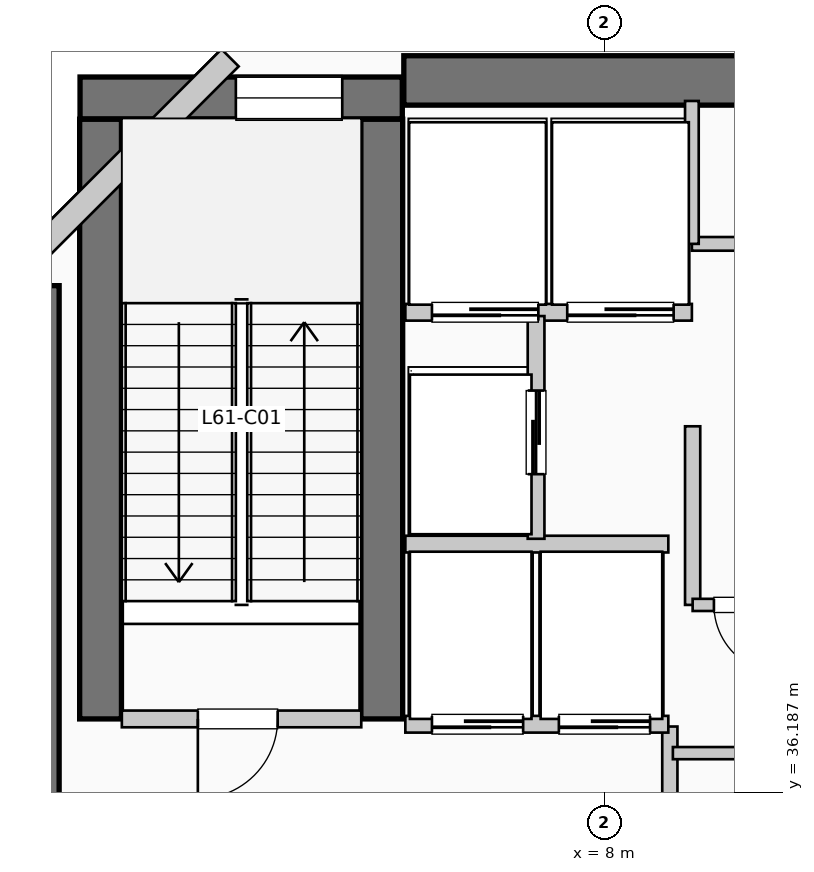
"""IFC4 building model, lengths in metres.
Left out: names, types, materials, properties, quantities, classifications, styles, units other than length and angle.
Written with IfcOpenShell. Run it as: python <this file> out.ifc"""

import sys

from ifc_helpers import new_model, si_unit, direction, frame, frame_2d, origin, place, context, subcontext, project, spatial, rectangle, extrude, element, fill, save


model = new_model("IFC4")
c1 = context("Model", 3, precision=1e-05, world=origin(), true_north=direction((0.0, 1.0)))
c2 = subcontext(c1, "Body", "Model", "MODEL_VIEW")
j1 = project(units=[si_unit("LENGTHUNIT", "METRE"), si_unit("PLANEANGLEUNIT", "RADIAN")], contexts=[c1])
p1 = place(None, origin())
s1 = spatial("IfcSite", under=j1, at=p1, CompositionType="ELEMENT")
p2 = place(p1, origin())
s2 = spatial("IfcBuilding", under=s1, at=p2, CompositionType="ELEMENT")
p3 = place(p2, frame((0.0, 0.0, 251.46)))
s3 = spatial("IfcBuildingStorey", under=s2, at=p3, CompositionType="ELEMENT", Elevation=251.46)
p4 = place(p3, frame((5.36, 45.55, 0.0), z_axis=(0.0, 0.0, 1.0), x_axis=(1.0, 0.0, 0.0)))
e1 = element("IfcWall", 1, at=p4, inside=s3, PredefinedType="SHEAR", context=c2, shape_type="SweptSolid", body=[
    extrude(rectangle(XDim=13.98, YDim=0.65, at=frame_2d((6.99, 0.0))), origin(), (0.0, 0.0, 1.0), 4.95),
])
p5 = place(p3, frame((0.5, 34.95, 0.0), z_axis=(0.0, 0.0, 1.0), x_axis=(0.0, 1.0, 0.0)))
e2 = element("IfcWall", 2, at=p5, inside=s3, PredefinedType="SHEAR", context=c2, shape_type="SweptSolid", body=[
    extrude(rectangle(XDim=7.9, YDim=0.65, at=frame_2d((3.95, 0.0))), origin(), (0.0, 0.0, 1.0), 4.95),
])
for number, where, z_axis, x_axis in (
    (3, (1.37, 37.15, 0.0), (0.0, 0.0, 1.0), (0.0, 1.0, 0.0)),
    (4, (5.07, 37.15, 0.0), (0.0, 0.0, 1.0), (0.0, 1.0, 0.0)),
):
    element("IfcWall", number, at=place(p3, frame(where, z_axis=z_axis, x_axis=x_axis)), inside=s3, PredefinedType="SHEAR", context=c2, shape_type="SweptSolid", body=[
        extrude(rectangle(XDim=7.89, YDim=0.55, at=frame_2d((3.945, 0.0))), origin(), (0.0, 0.0, 1.0), 4.95),
    ])
p6 = place(p3, frame((1.1, 45.32, 0.0), z_axis=(0.0, 0.0, 1.0), x_axis=(1.0, 0.0, 0.0)))
e5 = element("IfcWall", 5, at=p6, inside=s3, PredefinedType="SHEAR", context=c2, shape_type="SweptSolid", body=[
    extrude(rectangle(XDim=4.24, YDim=0.55, at=frame_2d((2.12, 0.0))), origin(), (0.0, 0.0, 1.0), 4.95),
])
p7 = place(p6, frame((2.05, 0.0, 1.05)))
e6 = element("IfcOpeningElement", 6, at=p7, cuts=e5, PredefinedType="OPENING", context=c2, shape_type="SweptSolid", body=[
    extrude(rectangle(XDim=1.4, YDim=1.8, at=frame_2d((0.7, 0.9))), frame((0.0, 0.285, 0.0), z_axis=(0.0, -1.0, 0.0), x_axis=(1.0, 0.0, 0.0)), (0.0, 0.0, 1.0), 0.57),
])
p8 = place(p3, frame((3.074, 45.848, 0.0), z_axis=(0.0, 0.0, 1.0), x_axis=(-0.707106781187, -0.707106781187, 0.0)))
e7 = element("IfcWall", 7, at=p8, inside=s3, PredefinedType="SOLIDWALL", context=c2, shape_type="SweptSolid", body=[
    extrude(rectangle(XDim=4.133, YDim=0.32, at=frame_2d((2.066, 0.0))), origin(), (0.0, 0.0, 1.0), 4.7),
])
p9 = place(p3, frame((1.65, 37.15, 0.0), z_axis=(0.0, 0.0, 1.0), x_axis=(1.0, 0.0, 0.0)))
e8 = element("IfcWall", 8, at=p9, inside=s3, PredefinedType="PARTITIONING", context=c2, shape_type="SweptSolid", body=[
    extrude(rectangle(XDim=3.15, YDim=0.22, at=frame_2d((1.575, 0.0))), origin(), (0.0, 0.0, 1.0), 4.7),
])
p10 = place(p9, frame((2.05, 0.0, 0.0), z_axis=(0.0, 0.0, 1.0), x_axis=(-1.0, 0.0, 0.0)))
e9 = element("IfcOpeningElement", 9, at=p10, cuts=e8, PredefinedType="OPENING", context=c2, shape_type="SweptSolid", body=[
    extrude(rectangle(XDim=1.05, YDim=2.15, at=frame_2d((0.525, 1.075))), frame((0.0, 0.12, 0.0), z_axis=(0.0, -1.0, 0.0), x_axis=(1.0, 0.0, 0.0)), (0.0, 0.0, 1.0), 0.24),
])
p11 = place(p3, frame((8.86, 34.55, 0.0), z_axis=(0.0, 0.0, 1.0), x_axis=(0.0, 1.0, 0.0)))
e10 = element("IfcWall", 10, at=p11, inside=s3, PredefinedType="PARTITIONING", context=c2, shape_type="SweptSolid", body=[
    extrude(rectangle(XDim=2.5, YDim=0.2, at=frame_2d((1.25, 0.0))), origin(), (0.0, 0.0, 1.0), 4.7),
])
p12 = place(p3, frame((5.38, 37.08, 0.0), z_axis=(0.0, 0.0, 1.0), x_axis=(1.0, 0.0, 0.0)))
e11 = element("IfcWall", 11, at=p12, inside=s3, PredefinedType="PARTITIONING", context=c2, shape_type="SweptSolid", body=[
    extrude(rectangle(XDim=3.46, YDim=0.22, at=frame_2d((1.73, 0.0))), origin(), (0.0, 0.0, 1.0), 4.7),
])
p13 = place(p12, frame((1.55, 0.0, 0.0), z_axis=(0.0, 0.0, 1.0), x_axis=(-1.0, 0.0, 0.0)))
e12 = element("IfcOpeningElement", 12, at=p13, cuts=e11, PredefinedType="OPENING", context=c2, shape_type="SweptSolid", body=[
    extrude(rectangle(XDim=1.2, YDim=2.2, at=frame_2d((0.6, 1.1))), frame((0.0, 0.12, 0.0), z_axis=(0.0, -1.0, 0.0), x_axis=(1.0, 0.0, 0.0)), (0.0, 0.0, 1.0), 0.24),
])
p14 = place(p12, frame((3.22, 0.0, 0.0), z_axis=(0.0, 0.0, 1.0), x_axis=(-1.0, 0.0, 0.0)))
e13 = element("IfcOpeningElement", 13, at=p14, cuts=e11, PredefinedType="OPENING", context=c2, shape_type="SweptSolid", body=[
    extrude(rectangle(XDim=1.2, YDim=2.2, at=frame_2d((0.6, 1.1))), frame((0.0, 0.12, 0.0), z_axis=(0.0, -1.0, 0.0), x_axis=(1.0, 0.0, 0.0)), (0.0, 0.0, 1.0), 0.24),
])
p15 = place(p3, frame((5.38, 39.45, 0.0), z_axis=(0.0, 0.0, 1.0), x_axis=(1.0, 0.0, 0.0)))
e14 = element("IfcWall", 14, at=p15, inside=s3, PredefinedType="PARTITIONING", context=c2, shape_type="SweptSolid", body=[
    extrude(rectangle(XDim=3.46, YDim=0.22, at=frame_2d((1.73, 0.0))), origin(), (0.0, 0.0, 1.0), 4.7),
])
p16 = place(p3, frame((5.38, 42.5, 0.0), z_axis=(0.0, 0.0, 1.0), x_axis=(1.0, 0.0, 0.0)))
e15 = element("IfcWall", 15, at=p16, inside=s3, PredefinedType="PARTITIONING", context=c2, shape_type="SweptSolid", body=[
    extrude(rectangle(XDim=3.77, YDim=0.22, at=frame_2d((1.885, 0.0))), origin(), (0.0, 0.0, 1.0), 4.7),
])
p17 = place(p16, frame((1.75, 0.0, 0.0), z_axis=(0.0, 0.0, 1.0), x_axis=(-1.0, 0.0, 0.0)))
e16 = element("IfcOpeningElement", 16, at=p17, cuts=e15, PredefinedType="OPENING", context=c2, shape_type="SweptSolid", body=[
    extrude(rectangle(XDim=1.4, YDim=2.2, at=frame_2d((0.7, 1.1))), frame((0.0, 0.12, 0.0), z_axis=(0.0, -1.0, 0.0), x_axis=(1.0, 0.0, 0.0)), (0.0, 0.0, 1.0), 0.24),
])
p18 = place(p16, frame((3.53, 0.0, 0.0), z_axis=(0.0, 0.0, 1.0), x_axis=(-1.0, 0.0, 0.0)))
e17 = element("IfcOpeningElement", 17, at=p18, cuts=e15, PredefinedType="OPENING", context=c2, shape_type="SweptSolid", body=[
    extrude(rectangle(XDim=1.4, YDim=2.2, at=frame_2d((0.7, 1.1))), frame((0.0, 0.12, 0.0), z_axis=(0.0, -1.0, 0.0), x_axis=(1.0, 0.0, 0.0)), (0.0, 0.0, 1.0), 0.24),
])
p19 = place(p3, frame((7.1, 39.52, 0.0), z_axis=(0.0, 0.0, 1.0), x_axis=(0.0, 1.0, 0.0)))
e18 = element("IfcWall", 18, at=p19, inside=s3, PredefinedType="PARTITIONING", context=c2, shape_type="SweptSolid", body=[
    extrude(rectangle(XDim=2.93, YDim=0.22, at=frame_2d((1.465, 0.0))), origin(), (0.0, 0.0, 1.0), 4.7),
])
p20 = place(p19, frame((0.85, 0.0, 0.0)))
e19 = element("IfcOpeningElement", 19, at=p20, cuts=e18, PredefinedType="OPENING", context=c2, shape_type="SweptSolid", body=[
    extrude(rectangle(XDim=1.1, YDim=2.2, at=frame_2d((0.55, 1.1))), frame((0.0, 0.12, 0.0), z_axis=(0.0, -1.0, 0.0), x_axis=(1.0, 0.0, 0.0)), (0.0, 0.0, 1.0), 0.24),
])
p21 = place(p3, frame((9.16, 38.65, 0.0), z_axis=(0.0, 0.0, 1.0), x_axis=(0.0, 1.0, 0.0)))
e20 = element("IfcWall", 20, at=p21, inside=s3, PredefinedType="PARTITIONING", context=c2, shape_type="SweptSolid", body=[
    extrude(rectangle(XDim=2.35, YDim=0.2, at=frame_2d((1.175, 0.0))), origin(), (0.0, 0.0, 1.0), 4.7),
])
p22 = place(p3, frame((8.9, 36.7, 0.0), z_axis=(0.0, 0.0, 1.0), x_axis=(1.0, 0.0, 0.0)))
e21 = element("IfcWall", 21, at=p22, inside=s3, PredefinedType="PARTITIONING", context=c2, shape_type="SweptSolid", body=[
    extrude(rectangle(XDim=3.25, YDim=0.16, at=frame_2d((1.625, 0.0))), origin(), (0.0, 0.0, 1.0), 4.7),
])
p23 = place(p22, frame((1.1, 0.0, 0.0)))
e22 = element("IfcOpeningElement", 22, at=p23, cuts=e21, PredefinedType="OPENING", context=c2, shape_type="SweptSolid", body=[
    extrude(rectangle(XDim=0.95, YDim=2.15, at=frame_2d((0.475, 1.075))), frame((0.0, 0.09, 0.0), z_axis=(0.0, -1.0, 0.0), x_axis=(1.0, 0.0, 0.0)), (0.0, 0.0, 1.0), 0.18),
])
p24 = place(p3, frame((9.16, 38.65, 0.0), z_axis=(0.0, 0.0, 1.0), x_axis=(1.0, 0.0, 0.0)))
e23 = element("IfcWall", 23, at=p24, inside=s3, PredefinedType="PARTITIONING", context=c2, shape_type="SweptSolid", body=[
    extrude(rectangle(XDim=3.42, YDim=0.16, at=frame_2d((1.71, 0.0))), origin(), (0.0, 0.0, 1.0), 4.7),
])
p25 = place(p24, frame((1.18, 0.0, 0.0), z_axis=(0.0, 0.0, 1.0), x_axis=(-1.0, 0.0, 0.0)))
e24 = element("IfcOpeningElement", 24, at=p25, cuts=e23, PredefinedType="OPENING", context=c2, shape_type="SweptSolid", body=[
    extrude(rectangle(XDim=0.9, YDim=2.15, at=frame_2d((0.45, 1.075))), frame((0.0, 0.09, 0.0), z_axis=(0.0, -1.0, 0.0), x_axis=(1.0, 0.0, 0.0)), (0.0, 0.0, 1.0), 0.18),
])
p26 = place(p24, frame((2.6, 0.0, 0.0), z_axis=(0.0, 0.0, 1.0), x_axis=(-1.0, 0.0, 0.0)))
e25 = element("IfcOpeningElement", 25, at=p26, cuts=e23, PredefinedType="OPENING", context=c2, shape_type="SweptSolid", body=[
    extrude(rectangle(XDim=0.9, YDim=2.15, at=frame_2d((0.45, 1.075))), frame((0.0, 0.09, 0.0), z_axis=(0.0, -1.0, 0.0), x_axis=(1.0, 0.0, 0.0)), (0.0, 0.0, 1.0), 0.18),
])
p27 = place(p3, frame((9.15, 43.4, 0.0), z_axis=(0.0, 0.0, 1.0), x_axis=(1.0, 0.0, 0.0)))
e26 = element("IfcWall", 26, at=p27, inside=s3, PredefinedType="PLUMBINGWALL", context=c2, shape_type="SweptSolid", body=[
    extrude(rectangle(XDim=9.33, YDim=0.18, at=frame_2d((4.665, 0.0))), origin(), (0.0, 0.0, 1.0), 4.7),
])
p28 = place(p27, frame((0.72, 0.0, 0.0)))
e27 = element("IfcOpeningElement", 27, at=p28, cuts=e26, PredefinedType="OPENING", context=c2, shape_type="SweptSolid", body=[
    extrude(rectangle(XDim=0.92, YDim=2.1, at=frame_2d((0.46, 1.05))), frame((0.0, 0.1, 0.0), z_axis=(0.0, -1.0, 0.0), x_axis=(1.0, 0.0, 0.0)), (0.0, 0.0, 1.0), 0.2),
])
p29 = place(p27, frame((3.02, 0.0, 0.0)))
e28 = element("IfcOpeningElement", 28, at=p29, cuts=e26, PredefinedType="OPENING", context=c2, shape_type="SweptSolid", body=[
    extrude(rectangle(XDim=0.92, YDim=2.1, at=frame_2d((0.46, 1.05))), frame((0.0, 0.1, 0.0), z_axis=(0.0, -1.0, 0.0), x_axis=(1.0, 0.0, 0.0)), (0.0, 0.0, 1.0), 0.2),
])
p30 = place(p27, frame((5.34, 0.0, 0.0)))
e29 = element("IfcOpeningElement", 29, at=p30, cuts=e26, PredefinedType="OPENING", context=c2, shape_type="SweptSolid", body=[
    extrude(rectangle(XDim=0.92, YDim=2.1, at=frame_2d((0.46, 1.05))), frame((0.0, 0.1, 0.0), z_axis=(0.0, -1.0, 0.0), x_axis=(1.0, 0.0, 0.0)), (0.0, 0.0, 1.0), 0.2),
])
p31 = place(p27, frame((7.66, 0.0, 0.0)))
e30 = element("IfcOpeningElement", 30, at=p31, cuts=e26, PredefinedType="OPENING", context=c2, shape_type="SweptSolid", body=[
    extrude(rectangle(XDim=0.95, YDim=2.1, at=frame_2d((0.475, 1.05))), frame((0.0, 0.1, 0.0), z_axis=(0.0, -1.0, 0.0), x_axis=(1.0, 0.0, 0.0)), (0.0, 0.0, 1.0), 0.2),
])
p32 = place(p3, frame((9.15, 43.4, 0.0), z_axis=(0.0, 0.0, 1.0), x_axis=(0.0, 1.0, 0.0)))
e31 = element("IfcWall", 31, at=p32, inside=s3, PredefinedType="PLUMBINGWALL", context=c2, shape_type="SweptSolid", body=[
    extrude(rectangle(XDim=1.88, YDim=0.18, at=frame_2d((0.94, 0.0))), origin(), (0.0, 0.0, 1.0), 4.7),
])
p33 = place(p7, origin())
e32 = element("IfcWindow", 32, at=p33, inside=s3, PartitioningType="SINGLE_PANEL", PredefinedType="WINDOW", context=c2, shape_type="SweptSolid", body=[
    extrude(rectangle(XDim=1.4, YDim=1.8, at=frame_2d((0.7, 0.9))), frame((0.0, 0.03, 0.0), z_axis=(0.0, -1.0, 0.0), x_axis=(1.0, 0.0, 0.0)), (0.0, 0.0, 1.0), 0.06),
])
fill(e6, e32)
p34 = place(p10, origin())
e33 = element("IfcDoor", 33, at=p34, inside=s3, OperationType="SINGLE_SWING_LEFT", PredefinedType="DOOR", context=c2, shape_type="SweptSolid", body=[
    extrude(rectangle(XDim=1.05, YDim=2.15, at=frame_2d((0.525, 1.075))), frame((0.0, 0.025, 0.0), z_axis=(0.0, -1.0, 0.0), x_axis=(1.0, 0.0, 0.0)), (0.0, 0.0, 1.0), 0.05),
])
fill(e9, e33)
p35 = place(p13, origin())
e34 = element("IfcDoor", 34, at=p35, inside=s3, OperationType="SLIDING_TO_RIGHT", PredefinedType="DOOR", context=c2, shape_type="SweptSolid", body=[
    extrude(rectangle(XDim=1.2, YDim=2.2, at=frame_2d((0.6, 1.1))), frame((0.0, 0.025, 0.0), z_axis=(0.0, -1.0, 0.0), x_axis=(1.0, 0.0, 0.0)), (0.0, 0.0, 1.0), 0.05),
])
fill(e12, e34)
p36 = place(p14, origin())
e35 = element("IfcDoor", 35, at=p36, inside=s3, OperationType="SLIDING_TO_RIGHT", PredefinedType="DOOR", context=c2, shape_type="SweptSolid", body=[
    extrude(rectangle(XDim=1.2, YDim=2.2, at=frame_2d((0.6, 1.1))), frame((0.0, 0.025, 0.0), z_axis=(0.0, -1.0, 0.0), x_axis=(1.0, 0.0, 0.0)), (0.0, 0.0, 1.0), 0.05),
])
fill(e13, e35)
p37 = place(p17, origin())
e36 = element("IfcDoor", 36, at=p37, inside=s3, OperationType="SLIDING_TO_LEFT", PredefinedType="DOOR", context=c2, shape_type="SweptSolid", body=[
    extrude(rectangle(XDim=1.4, YDim=2.2, at=frame_2d((0.7, 1.1))), frame((0.0, 0.025, 0.0), z_axis=(0.0, -1.0, 0.0), x_axis=(1.0, 0.0, 0.0)), (0.0, 0.0, 1.0), 0.05),
])
fill(e16, e36)
p38 = place(p18, origin())
e37 = element("IfcDoor", 37, at=p38, inside=s3, OperationType="SLIDING_TO_LEFT", PredefinedType="DOOR", context=c2, shape_type="SweptSolid", body=[
    extrude(rectangle(XDim=1.4, YDim=2.2, at=frame_2d((0.7, 1.1))), frame((0.0, 0.025, 0.0), z_axis=(0.0, -1.0, 0.0), x_axis=(1.0, 0.0, 0.0)), (0.0, 0.0, 1.0), 0.05),
])
fill(e17, e37)
p39 = place(p20, origin())
e38 = element("IfcDoor", 38, at=p39, inside=s3, OperationType="SLIDING_TO_LEFT", PredefinedType="DOOR", context=c2, shape_type="SweptSolid", body=[
    extrude(rectangle(XDim=1.1, YDim=2.2, at=frame_2d((0.55, 1.1))), frame((0.0, 0.025, 0.0), z_axis=(0.0, -1.0, 0.0), x_axis=(1.0, 0.0, 0.0)), (0.0, 0.0, 1.0), 0.05),
])
fill(e19, e38)
p40 = place(p25, origin())
e39 = element("IfcDoor", 39, at=p40, inside=s3, OperationType="SINGLE_SWING_RIGHT", PredefinedType="DOOR", context=c2, shape_type="SweptSolid", body=[
    extrude(rectangle(XDim=0.9, YDim=2.15, at=frame_2d((0.45, 1.075))), frame((0.0, 0.025, 0.0), z_axis=(0.0, -1.0, 0.0), x_axis=(1.0, 0.0, 0.0)), (0.0, 0.0, 1.0), 0.05),
])
fill(e24, e39)
save(model, sys.argv[1])
